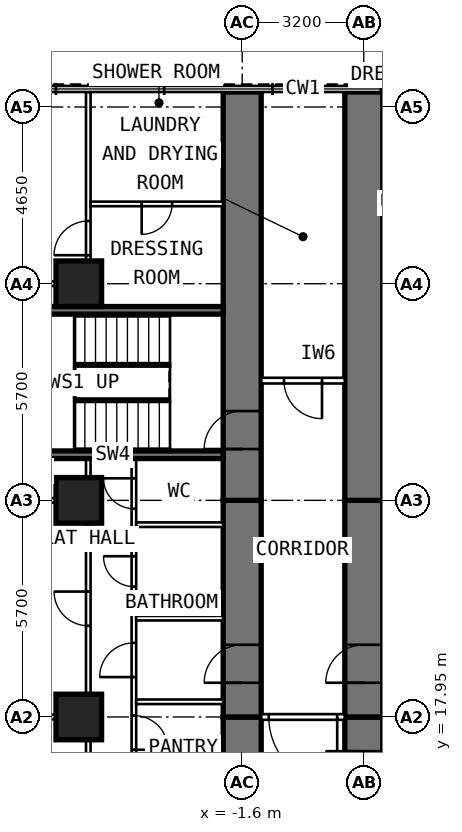
"""IFC4 building model, lengths in metres.
Left out: names, types, materials, properties, quantities, classifications, styles, units other than length and angle.
Written with IfcOpenShell. Run it as: python <this file> out.ifc"""

import sys

from ifc_helpers import new_model, si_unit, direction, frame, frame_2d, origin, origin_2d, place, context, subcontext, project, spatial, rectangle, extrude, element, fill, save


model = new_model("IFC4")
c1 = context("Model", 3, precision=1e-05, world=origin(), true_north=direction((0.0, 1.0)))
c2 = subcontext(c1, "Body", "Model", "MODEL_VIEW")
j1 = project(units=[si_unit("LENGTHUNIT", "METRE"), si_unit("PLANEANGLEUNIT", "RADIAN")], contexts=[c1])
p1 = place(None, origin())
s1 = spatial("IfcSite", under=j1, at=p1, CompositionType="ELEMENT")
p2 = place(p1, origin())
s2 = spatial("IfcBuilding", under=s1, at=p2, CompositionType="ELEMENT")
p3 = place(p2, frame((0.0, 0.0, 106.0)))
s3 = spatial("IfcBuildingStorey", under=s2, at=p3, CompositionType="ELEMENT", Elevation=106.0)
for number, where, z_axis, x_axis in (
    (1, (-5.9, 17.95, 0.0), (0.0, 0.0, 1.0), (0.0, 1.0, 0.0)),
    (2, (-5.9, 23.65, 0.0), (0.0, 0.0, 1.0), (0.0, 1.0, 0.0)),
    (3, (-5.9, 29.35, 0.0), (0.0, 0.0, 1.0), (0.0, 1.0, 0.0)),
):
    element("IfcColumn", number, at=place(p3, frame(where, z_axis=z_axis, x_axis=x_axis)), inside=s3, PredefinedType="COLUMN", context=c2, shape_type="SweptSolid", body=[
        extrude(rectangle(XDim=1.2, YDim=1.2, at=origin_2d()), origin(), (0.0, 0.0, 1.0), 3.6),
    ])
p4 = place(p3, frame((-1.6, 9.6, 0.0), z_axis=(0.0, 0.0, 1.0), x_axis=(0.0, 1.0, 0.0)))
e4 = element("IfcWall", 4, at=p4, inside=s3, PredefinedType="SHEAR", context=c2, shape_type="SweptSolid", body=[
    extrude(rectangle(XDim=8.35, YDim=1.0, at=frame_2d((4.175, 0.0))), origin(), (0.0, 0.0, 1.0), 3.6),
])
p5 = place(p4, frame((1.3, 0.0, 0.0)))
e5 = element("IfcOpeningElement", 5, at=p5, cuts=e4, PredefinedType="OPENING", context=c2, shape_type="SweptSolid", body=[
    extrude(rectangle(XDim=1.0, YDim=2.1, at=frame_2d((0.5, 1.05))), frame((0.0, 0.512, 0.0), z_axis=(0.0, -1.0, 0.0), x_axis=(1.0, 0.0, 0.0)), (0.0, 0.0, 1.0), 1.024),
])
p6 = place(p3, frame((-1.6, 17.95, 0.0), z_axis=(0.0, 0.0, 1.0), x_axis=(0.0, 1.0, 0.0)))
e6 = element("IfcWall", 6, at=p6, inside=s3, PredefinedType="SHEAR", context=c2, shape_type="SweptSolid", body=[
    extrude(rectangle(XDim=5.7, YDim=1.0, at=frame_2d((2.85, 0.0))), origin(), (0.0, 0.0, 1.0), 3.6),
])
p7 = place(p6, frame((0.9, 0.0, 0.0)))
e7 = element("IfcOpeningElement", 7, at=p7, cuts=e6, PredefinedType="OPENING", context=c2, shape_type="SweptSolid", body=[
    extrude(rectangle(XDim=1.0, YDim=2.1, at=frame_2d((0.5, 1.05))), frame((0.0, 0.512, 0.0), z_axis=(0.0, -1.0, 0.0), x_axis=(1.0, 0.0, 0.0)), (0.0, 0.0, 1.0), 1.024),
])
p8 = place(p3, frame((-1.6, 23.65, 0.0), z_axis=(0.0, 0.0, 1.0), x_axis=(0.0, 1.0, 0.0)))
e8 = element("IfcWall", 8, at=p8, inside=s3, PredefinedType="SHEAR", context=c2, shape_type="SweptSolid", body=[
    extrude(rectangle(XDim=10.745, YDim=1.0, at=frame_2d((5.373, 0.0))), origin(), (0.0, 0.0, 1.0), 3.6),
])
p9 = place(p8, frame((1.35, 0.0, 0.0)))
e9 = element("IfcOpeningElement", 9, at=p9, cuts=e8, PredefinedType="OPENING", context=c2, shape_type="SweptSolid", body=[
    extrude(rectangle(XDim=1.0, YDim=2.1, at=frame_2d((0.5, 1.05))), frame((0.0, 0.512, 0.0), z_axis=(0.0, -1.0, 0.0), x_axis=(1.0, 0.0, 0.0)), (0.0, 0.0, 1.0), 1.024),
])
p10 = place(p3, frame((1.6, 9.6, 0.0), z_axis=(0.0, 0.0, 1.0), x_axis=(0.0, 1.0, 0.0)))
e10 = element("IfcWall", 10, at=p10, inside=s3, PredefinedType="SHEAR", context=c2, shape_type="SweptSolid", body=[
    extrude(rectangle(XDim=8.35, YDim=1.0, at=frame_2d((4.175, 0.0))), origin(), (0.0, 0.0, 1.0), 3.6),
])
p11 = place(p10, frame((6.45, 0.0, 0.0)))
e11 = element("IfcOpeningElement", 11, at=p11, cuts=e10, PredefinedType="OPENING", context=c2, shape_type="SweptSolid", body=[
    extrude(rectangle(XDim=1.0, YDim=2.1, at=frame_2d((0.5, 1.05))), frame((0.0, 0.512, 0.0), z_axis=(0.0, -1.0, 0.0), x_axis=(1.0, 0.0, 0.0)), (0.0, 0.0, 1.0), 1.024),
])
p12 = place(p3, frame((1.6, 17.95, 0.0), z_axis=(0.0, 0.0, 1.0), x_axis=(0.0, 1.0, 0.0)))
e12 = element("IfcWall", 12, at=p12, inside=s3, PredefinedType="SHEAR", context=c2, shape_type="SweptSolid", body=[
    extrude(rectangle(XDim=5.7, YDim=1.0, at=frame_2d((2.85, 0.0))), origin(), (0.0, 0.0, 1.0), 3.6),
])
p13 = place(p12, frame((0.9, 0.0, 0.0)))
e13 = element("IfcOpeningElement", 13, at=p13, cuts=e12, PredefinedType="OPENING", context=c2, shape_type="SweptSolid", body=[
    extrude(rectangle(XDim=1.0, YDim=2.1, at=frame_2d((0.5, 1.05))), frame((0.0, 0.512, 0.0), z_axis=(0.0, -1.0, 0.0), x_axis=(1.0, 0.0, 0.0)), (0.0, 0.0, 1.0), 1.024),
])
p14 = place(p3, frame((1.6, 23.65, 0.0), z_axis=(0.0, 0.0, 1.0), x_axis=(0.0, 1.0, 0.0)))
e14 = element("IfcWall", 14, at=p14, inside=s3, PredefinedType="SHEAR", context=c2, shape_type="SweptSolid", body=[
    extrude(rectangle(XDim=10.745, YDim=1.0, at=frame_2d((5.373, 0.0))), origin(), (0.0, 0.0, 1.0), 3.6),
])
p15 = place(p3, frame((-4.45, 15.2, 0.0), z_axis=(0.0, 0.0, 1.0), x_axis=(0.0, 1.0, 0.0)))
e15 = element("IfcWall", 15, at=p15, inside=s3, PredefinedType="PARTITIONING", context=c2, shape_type="SweptSolid", body=[
    extrude(rectangle(XDim=9.55, YDim=0.12, at=frame_2d((4.775, 0.0))), origin(), (0.0, 0.0, 1.0), 3.35),
])
p16 = place(p15, frame((0.312, 0.0, 0.0)))
e16 = element("IfcOpeningElement", 16, at=p16, cuts=e15, PredefinedType="OPENING", context=c2, shape_type="SweptSolid", body=[
    extrude(rectangle(XDim=0.8, YDim=2.1, at=frame_2d((0.4, 1.05))), frame((0.0, 0.072, 0.0), z_axis=(0.0, -1.0, 0.0), x_axis=(1.0, 0.0, 0.0)), (0.0, 0.0, 1.0), 0.144),
])
p17 = place(p15, frame((1.887, 0.0, 0.0)))
e17 = element("IfcOpeningElement", 17, at=p17, cuts=e15, PredefinedType="OPENING", context=c2, shape_type="SweptSolid", body=[
    extrude(rectangle(XDim=0.9, YDim=2.1, at=frame_2d((0.45, 1.05))), frame((0.0, 0.072, 0.0), z_axis=(0.0, -1.0, 0.0), x_axis=(1.0, 0.0, 0.0)), (0.0, 0.0, 1.0), 0.144),
])
p18 = place(p15, frame((3.8, 0.0, 0.0)))
e18 = element("IfcOpeningElement", 18, at=p18, cuts=e15, PredefinedType="OPENING", context=c2, shape_type="SweptSolid", body=[
    extrude(rectangle(XDim=0.9, YDim=2.1, at=frame_2d((0.45, 1.05))), frame((0.0, 0.072, 0.0), z_axis=(0.0, -1.0, 0.0), x_axis=(1.0, 0.0, 0.0)), (0.0, 0.0, 1.0), 0.144),
])
p19 = place(p15, frame((6.18, 0.0, 0.0)))
e19 = element("IfcOpeningElement", 19, at=p19, cuts=e15, PredefinedType="OPENING", context=c2, shape_type="SweptSolid", body=[
    extrude(rectangle(XDim=0.8, YDim=2.1, at=frame_2d((0.4, 1.05))), frame((0.0, 0.072, 0.0), z_axis=(0.0, -1.0, 0.0), x_axis=(1.0, 0.0, 0.0)), (0.0, 0.0, 1.0), 0.144),
])
p20 = place(p15, frame((8.23, 0.0, 0.0)))
e20 = element("IfcOpeningElement", 20, at=p20, cuts=e15, PredefinedType="OPENING", context=c2, shape_type="SweptSolid", body=[
    extrude(rectangle(XDim=0.8, YDim=2.1, at=frame_2d((0.4, 1.05))), frame((0.0, 0.072, 0.0), z_axis=(0.0, -1.0, 0.0), x_axis=(1.0, 0.0, 0.0)), (0.0, 0.0, 1.0), 0.144),
])
p21 = place(p3, frame((-5.65, 15.2, 0.0), z_axis=(0.0, 0.0, 1.0), x_axis=(0.0, 1.0, 0.0)))
e21 = element("IfcWall", 21, at=p21, inside=s3, PredefinedType="PARTITIONING", context=c2, shape_type="SweptSolid", body=[
    extrude(rectangle(XDim=9.55, YDim=0.12, at=frame_2d((4.775, 0.0))), origin(), (0.0, 0.0, 1.0), 3.35),
])
p22 = place(p21, frame((0.875, 0.0, 0.0)))
e22 = element("IfcOpeningElement", 22, at=p22, cuts=e21, PredefinedType="OPENING", context=c2, shape_type="SweptSolid", body=[
    extrude(rectangle(XDim=0.9, YDim=2.1, at=frame_2d((0.45, 1.05))), frame((0.0, 0.072, 0.0), z_axis=(0.0, -1.0, 0.0), x_axis=(1.0, 0.0, 0.0)), (0.0, 0.0, 1.0), 0.144),
])
p23 = place(p21, frame((5.15, 0.0, 0.0)))
e23 = element("IfcOpeningElement", 23, at=p23, cuts=e21, PredefinedType="OPENING", context=c2, shape_type="SweptSolid", body=[
    extrude(rectangle(XDim=0.9, YDim=2.1, at=frame_2d((0.45, 1.05))), frame((0.0, 0.072, 0.0), z_axis=(0.0, -1.0, 0.0), x_axis=(1.0, 0.0, 0.0)), (0.0, 0.0, 1.0), 0.144),
])
p24 = place(p3, frame((-5.71, 17.95, 0.0), z_axis=(0.0, 0.0, 1.0), x_axis=(-1.0, 0.0, 0.0)))
e24 = element("IfcWall", 24, at=p24, inside=s3, PredefinedType="PARTITIONING", context=c2, shape_type="SweptSolid", body=[
    extrude(rectangle(XDim=4.99, YDim=0.12, at=frame_2d((2.495, 0.0))), origin(), (0.0, 0.0, 1.0), 2.45),
])
for number, where, z_axis, x_axis in (
    (25, (-2.1, 18.35, 0.0), (0.0, 0.0, 1.0), (-1.0, 0.0, 0.0)),
    (26, (-2.1, 20.55, 0.0), (0.0, 0.0, 1.0), (-1.0, 0.0, 0.0)),
    (27, (-2.1, 23.01, 0.0), (0.0, 0.0, 1.0), (-1.0, 0.0, 0.0)),
):
    element("IfcWall", number, at=place(p3, frame(where, z_axis=z_axis, x_axis=x_axis)), inside=s3, PredefinedType="PARTITIONING", context=c2, shape_type="SweptSolid", body=[
        extrude(rectangle(XDim=2.29, YDim=0.12, at=frame_2d((1.145, 0.0))), origin(), (0.0, 0.0, 1.0), 3.35),
    ])
p25 = place(p3, frame((-5.71, 23.65, 0.0), z_axis=(0.0, 0.0, 1.0), x_axis=(-1.0, 0.0, 0.0)))
e28 = element("IfcWall", 28, at=p25, inside=s3, PredefinedType="PARTITIONING", context=c2, shape_type="SweptSolid", body=[
    extrude(rectangle(XDim=4.99, YDim=0.12, at=frame_2d((2.495, 0.0))), origin(), (0.0, 0.0, 1.0), 2.45),
])
p26 = place(p25, frame((2.74, 0.0, 0.0)))
e29 = element("IfcOpeningElement", 29, at=p26, cuts=e28, PredefinedType="OPENING", context=c2, shape_type="SweptSolid", body=[
    extrude(rectangle(XDim=0.9, YDim=2.1, at=frame_2d((0.45, 1.05))), frame((0.0, 0.072, 0.0), z_axis=(0.0, -1.0, 0.0), x_axis=(1.0, 0.0, 0.0)), (0.0, 0.0, 1.0), 0.144),
])
p27 = place(p3, frame((-5.71, 29.35, 0.0), z_axis=(0.0, 0.0, 1.0), x_axis=(-1.0, 0.0, 0.0)))
e30 = element("IfcWall", 30, at=p27, inside=s3, PredefinedType="PARTITIONING", context=c2, shape_type="SweptSolid", body=[
    extrude(rectangle(XDim=4.99, YDim=0.12, at=frame_2d((2.495, 0.0))), origin(), (0.0, 0.0, 1.0), 2.45),
])
p28 = place(p27, frame((2.74, 0.0, 0.0)))
e31 = element("IfcOpeningElement", 31, at=p28, cuts=e30, PredefinedType="OPENING", context=c2, shape_type="SweptSolid", body=[
    extrude(rectangle(XDim=0.9, YDim=2.1, at=frame_2d((0.45, 1.05))), frame((0.0, 0.072, 0.0), z_axis=(0.0, -1.0, 0.0), x_axis=(1.0, 0.0, 0.0)), (0.0, 0.0, 1.0), 0.144),
])
p29 = place(p3, frame((-5.65, 28.95, 0.0), z_axis=(0.0, 0.0, 1.0), x_axis=(0.0, 1.0, 0.0)))
e32 = element("IfcWall", 32, at=p29, inside=s3, PredefinedType="PARTITIONING", context=c2, shape_type="SweptSolid", body=[
    extrude(rectangle(XDim=5.445, YDim=0.12, at=frame_2d((2.723, 0.0))), origin(), (0.0, 0.0, 1.0), 3.35),
])
p30 = place(p29, frame((1.15, 0.0, 0.0)))
e33 = element("IfcOpeningElement", 33, at=p30, cuts=e32, PredefinedType="OPENING", context=c2, shape_type="SweptSolid", body=[
    extrude(rectangle(XDim=0.9, YDim=2.1, at=frame_2d((0.45, 1.05))), frame((0.0, 0.072, 0.0), z_axis=(0.0, -1.0, 0.0), x_axis=(1.0, 0.0, 0.0)), (0.0, 0.0, 1.0), 0.144),
])
p31 = place(p3, frame((-2.1, 31.45, 0.0), z_axis=(0.0, 0.0, 1.0), x_axis=(-1.0, 0.0, 0.0)))
e34 = element("IfcWall", 34, at=p31, inside=s3, PredefinedType="PARTITIONING", context=c2, shape_type="SweptSolid", body=[
    extrude(rectangle(XDim=3.49, YDim=0.12, at=frame_2d((1.745, 0.0))), origin(), (0.0, 0.0, 1.0), 3.35),
])
p32 = place(p31, frame((1.345, 0.0, 0.0)))
e35 = element("IfcOpeningElement", 35, at=p32, cuts=e34, PredefinedType="OPENING", context=c2, shape_type="SweptSolid", body=[
    extrude(rectangle(XDim=0.8, YDim=2.1, at=frame_2d((0.4, 1.05))), frame((0.0, 0.072, 0.0), z_axis=(0.0, -1.0, 0.0), x_axis=(1.0, 0.0, 0.0)), (0.0, 0.0, 1.0), 0.144),
])
p33 = place(p3, frame((2.1, 17.95, 0.0), z_axis=(0.0, 0.0, 1.0), x_axis=(1.0, 0.0, 0.0)))
e36 = element("IfcWall", 36, at=p33, inside=s3, PredefinedType="PARTITIONING", context=c2, shape_type="SweptSolid", body=[
    extrude(rectangle(XDim=8.6, YDim=0.2, at=frame_2d((4.3, 0.0))), origin(), (0.0, 0.0, 1.0), 2.45),
])
p34 = place(p3, frame((1.1, 26.8, 0.0), z_axis=(0.0, 0.0, 1.0), x_axis=(-1.0, 0.0, 0.0)))
e37 = element("IfcWall", 37, at=p34, inside=s3, PredefinedType="PARTITIONING", context=c2, shape_type="SweptSolid", body=[
    extrude(rectangle(XDim=2.2, YDim=0.15, at=frame_2d((1.1, 0.0))), origin(), (0.0, 0.0, 1.0), 3.35),
])
p35 = place(p34, frame((0.6, 0.0, 0.0)))
e38 = element("IfcOpeningElement", 38, at=p35, cuts=e37, PredefinedType="OPENING", context=c2, shape_type="SweptSolid", body=[
    extrude(rectangle(XDim=1.0, YDim=2.1, at=frame_2d((0.5, 1.05))), frame((0.0, 0.087, 0.0), z_axis=(0.0, -1.0, 0.0), x_axis=(1.0, 0.0, 0.0)), (0.0, 0.0, 1.0), 0.174),
])
p36 = place(p3, frame((1.1, 17.95, 0.0), z_axis=(0.0, 0.0, 1.0), x_axis=(-1.0, 0.0, 0.0)))
e39 = element("IfcWall", 39, at=p36, inside=s3, PredefinedType="PARTITIONING", context=c2, shape_type="SweptSolid", body=[
    extrude(rectangle(XDim=2.2, YDim=0.15, at=frame_2d((1.1, 0.0))), origin(), (0.0, 0.0, 1.0), 3.35),
])
p37 = place(p36, frame((0.2, 0.0, 0.0)))
e40 = element("IfcOpeningElement", 40, at=p37, cuts=e39, PredefinedType="OPENING", context=c2, shape_type="SweptSolid", body=[
    extrude(rectangle(XDim=1.8, YDim=2.1, at=frame_2d((0.9, 1.05))), frame((0.0, 0.087, 0.0), z_axis=(0.0, -1.0, 0.0), x_axis=(1.0, 0.0, 0.0)), (0.0, 0.0, 1.0), 0.174),
])
for number, where, z_axis, x_axis in (
    (41, (-2.1, 24.85, 0.0), (0.0, 0.0, 1.0), (-1.0, 0.0, 0.0)),
    (42, (-2.1, 28.65, 0.0), (0.0, 0.0, 1.0), (-1.0, 0.0, 0.0)),
):
    element("IfcWall", number, at=place(p3, frame(where, z_axis=z_axis, x_axis=x_axis)), inside=s3, PredefinedType="SHEAR", context=c2, shape_type="SweptSolid", body=[
        extrude(rectangle(XDim=5.8, YDim=0.2, at=frame_2d((2.9, 0.0))), origin(), (0.0, 0.0, 1.0), 3.33),
    ])
p38 = place(p7, origin())
e43 = element("IfcDoor", 43, at=p38, inside=s3, OperationType="SINGLE_SWING_LEFT", PredefinedType="DOOR", context=c2, shape_type="SweptSolid", body=[
    extrude(rectangle(XDim=1.0, YDim=2.1, at=frame_2d((0.5, 1.05))), frame((0.0, 0.25, 0.0), z_axis=(0.0, -1.0, 0.0), x_axis=(1.0, 0.0, 0.0)), (0.0, 0.0, 1.0), 0.5),
])
fill(e7, e43)
p39 = place(p23, origin())
e44 = element("IfcDoor", 44, at=p39, inside=s3, OperationType="SINGLE_SWING_RIGHT", PredefinedType="DOOR", context=c2, shape_type="SweptSolid", body=[
    extrude(rectangle(XDim=0.9, YDim=2.1, at=frame_2d((0.45, 1.05))), frame((0.0, 0.025, 0.0), z_axis=(0.0, -1.0, 0.0), x_axis=(1.0, 0.0, 0.0)), (0.0, 0.0, 1.0), 0.05),
])
fill(e23, e44)
p40 = place(p17, frame((0.9, 0.0, 0.0), z_axis=(0.0, 0.0, 1.0), x_axis=(-1.0, 0.0, 0.0)))
e45 = element("IfcDoor", 45, at=p40, inside=s3, OperationType="SINGLE_SWING_RIGHT", PredefinedType="DOOR", context=c2, shape_type="SweptSolid", body=[
    extrude(rectangle(XDim=0.9, YDim=2.1, at=frame_2d((0.45, 1.05))), frame((0.0, 0.025, 0.0), z_axis=(0.0, -1.0, 0.0), x_axis=(1.0, 0.0, 0.0)), (0.0, 0.0, 1.0), 0.05),
])
fill(e17, e45)
p41 = place(p18, origin())
e46 = element("IfcDoor", 46, at=p41, inside=s3, OperationType="SINGLE_SWING_LEFT", PredefinedType="DOOR", context=c2, shape_type="SweptSolid", body=[
    extrude(rectangle(XDim=0.9, YDim=2.1, at=frame_2d((0.45, 1.05))), frame((0.0, 0.025, 0.0), z_axis=(0.0, -1.0, 0.0), x_axis=(1.0, 0.0, 0.0)), (0.0, 0.0, 1.0), 0.05),
])
fill(e18, e46)
p42 = place(p19, origin())
e47 = element("IfcDoor", 47, at=p42, inside=s3, OperationType="SINGLE_SWING_RIGHT", PredefinedType="DOOR", context=c2, shape_type="SweptSolid", body=[
    extrude(rectangle(XDim=0.8, YDim=2.1, at=frame_2d((0.4, 1.05))), frame((0.0, 0.025, 0.0), z_axis=(0.0, -1.0, 0.0), x_axis=(1.0, 0.0, 0.0)), (0.0, 0.0, 1.0), 0.05),
])
fill(e19, e47)
p43 = place(p20, origin())
e48 = element("IfcDoor", 48, at=p43, inside=s3, OperationType="SINGLE_SWING_RIGHT", PredefinedType="DOOR", context=c2, shape_type="SweptSolid", body=[
    extrude(rectangle(XDim=0.8, YDim=2.1, at=frame_2d((0.4, 1.05))), frame((0.0, 0.025, 0.0), z_axis=(0.0, -1.0, 0.0), x_axis=(1.0, 0.0, 0.0)), (0.0, 0.0, 1.0), 0.05),
])
fill(e20, e48)
p44 = place(p30, origin())
e49 = element("IfcDoor", 49, at=p44, inside=s3, OperationType="SINGLE_SWING_LEFT", PredefinedType="DOOR", context=c2, shape_type="SweptSolid", body=[
    extrude(rectangle(XDim=0.9, YDim=2.1, at=frame_2d((0.45, 1.05))), frame((0.0, 0.025, 0.0), z_axis=(0.0, -1.0, 0.0), x_axis=(1.0, 0.0, 0.0)), (0.0, 0.0, 1.0), 0.05),
])
fill(e33, e49)
p45 = place(p32, origin())
e50 = element("IfcDoor", 50, at=p45, inside=s3, OperationType="SINGLE_SWING_RIGHT", PredefinedType="DOOR", context=c2, shape_type="SweptSolid", body=[
    extrude(rectangle(XDim=0.8, YDim=2.1, at=frame_2d((0.4, 1.05))), frame((0.0, 0.025, 0.0), z_axis=(0.0, -1.0, 0.0), x_axis=(1.0, 0.0, 0.0)), (0.0, 0.0, 1.0), 0.05),
])
fill(e35, e50)
p46 = place(p11, origin())
e51 = element("IfcDoor", 51, at=p46, inside=s3, OperationType="SINGLE_SWING_RIGHT", PredefinedType="DOOR", context=c2, shape_type="SweptSolid", body=[
    extrude(rectangle(XDim=1.0, YDim=2.1, at=frame_2d((0.5, 1.05))), frame((0.0, 0.25, 0.0), z_axis=(0.0, -1.0, 0.0), x_axis=(1.0, 0.0, 0.0)), (0.0, 0.0, 1.0), 0.5),
])
fill(e11, e51)
p47 = place(p13, origin())
e52 = element("IfcDoor", 52, at=p47, inside=s3, OperationType="SINGLE_SWING_LEFT", PredefinedType="DOOR", context=c2, shape_type="SweptSolid", body=[
    extrude(rectangle(XDim=1.0, YDim=2.1, at=frame_2d((0.5, 1.05))), frame((0.0, 0.25, 0.0), z_axis=(0.0, -1.0, 0.0), x_axis=(1.0, 0.0, 0.0)), (0.0, 0.0, 1.0), 0.5),
])
fill(e13, e52)
p48 = place(p35, origin())
e53 = element("IfcDoor", 53, at=p48, inside=s3, OperationType="SINGLE_SWING_LEFT", PredefinedType="DOOR", context=c2, shape_type="SweptSolid", body=[
    extrude(rectangle(XDim=1.0, YDim=2.1, at=frame_2d((0.5, 1.05))), frame((0.0, 0.025, 0.0), z_axis=(0.0, -1.0, 0.0), x_axis=(1.0, 0.0, 0.0)), (0.0, 0.0, 1.0), 0.05),
])
fill(e38, e53)
p49 = place(p37, origin())
e54 = element("IfcDoor", 54, at=p49, inside=s3, OperationType="DOUBLE_DOOR_DOUBLE_SWING", PredefinedType="DOOR", context=c2, shape_type="SweptSolid", body=[
    extrude(rectangle(XDim=1.8, YDim=2.1, at=frame_2d((0.9, 1.05))), frame((0.0, 0.025, 0.0), z_axis=(0.0, -1.0, 0.0), x_axis=(1.0, 0.0, 0.0)), (0.0, 0.0, 1.0), 0.05),
])
fill(e40, e54)
p50 = place(p9, origin())
e55 = element("IfcDoor", 55, at=p50, inside=s3, OperationType="SINGLE_SWING_LEFT", PredefinedType="DOOR", context=c2, shape_type="SweptSolid", body=[
    extrude(rectangle(XDim=1.0, YDim=2.1, at=frame_2d((0.5, 1.05))), frame((0.0, 0.25, 0.0), z_axis=(0.0, -1.0, 0.0), x_axis=(1.0, 0.0, 0.0)), (0.0, 0.0, 1.0), 0.5),
])
fill(e9, e55)
save(model, sys.argv[1])
